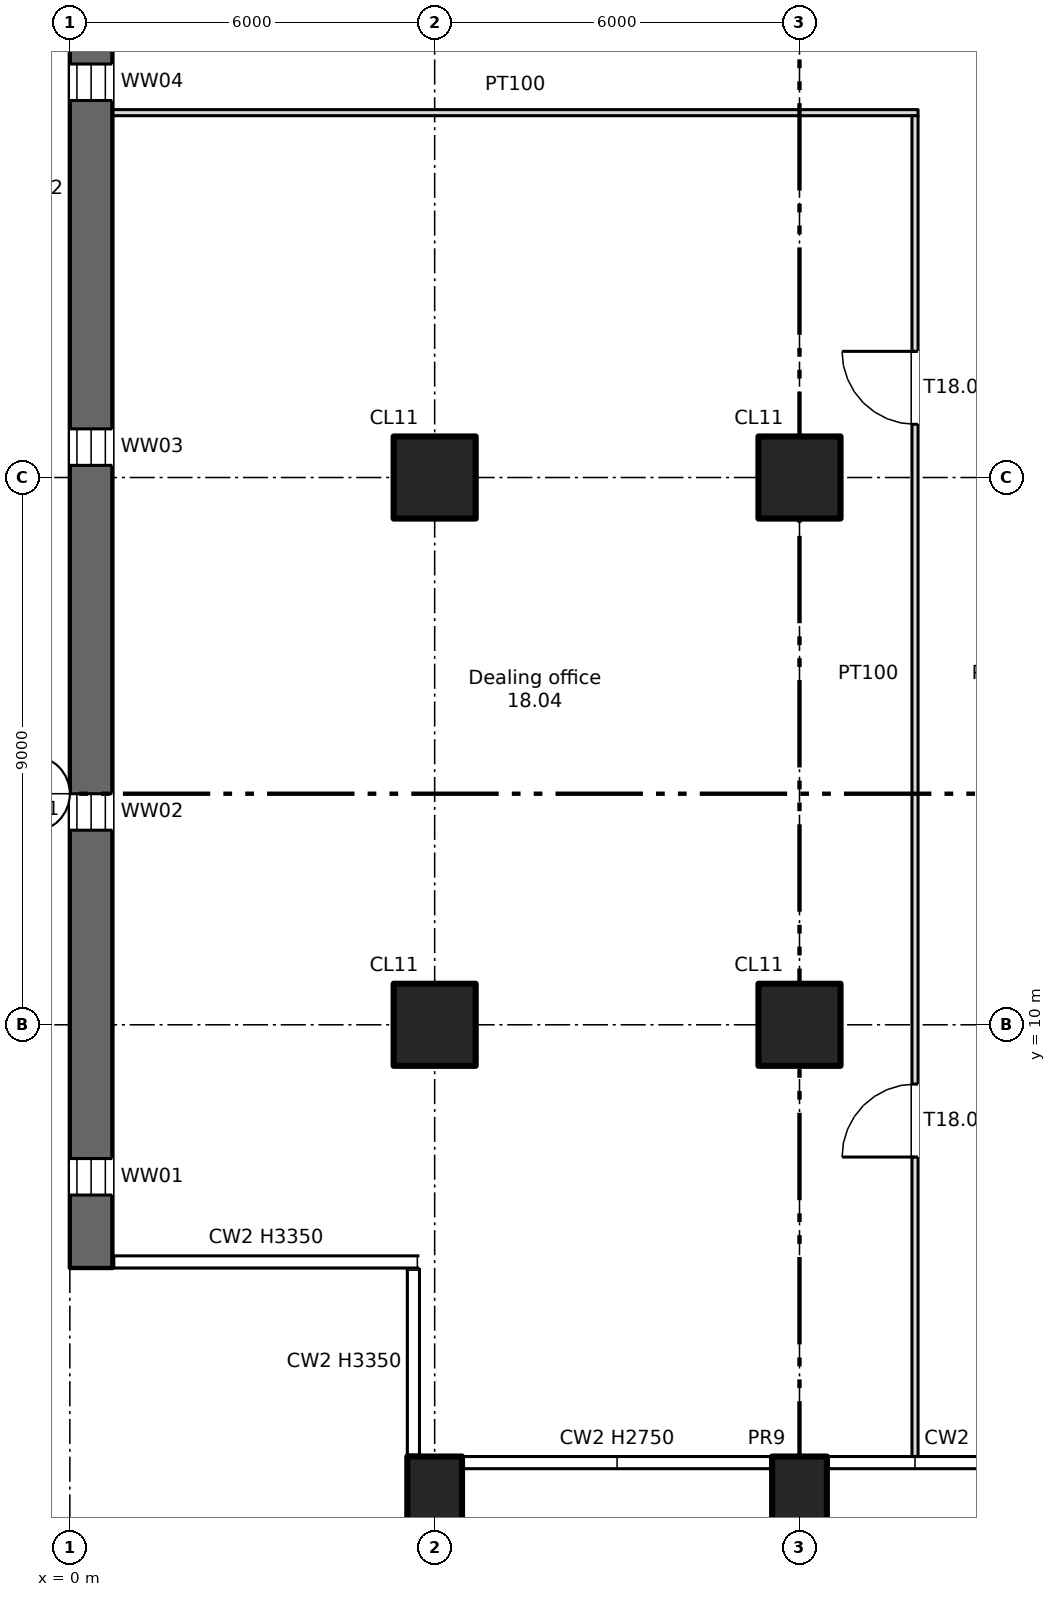
"""IFC4 building model, lengths in metres.
Left out: names, types, materials, properties, quantities, classifications, styles, units other than length and angle.
Written with IfcOpenShell. Run it as: python <this file> out.ifc"""

import sys

from ifc_helpers import new_model, si_unit, direction, frame, frame_2d, origin, origin_2d, place, context, subcontext, project, spatial, rectangle, extrude, element, fill, save


model = new_model("IFC4")
c1 = context("Model", 3, precision=1e-05, world=origin(), true_north=direction((0.0, 1.0)))
c2 = subcontext(c1, "Body", "Model", "MODEL_VIEW")
j1 = project(units=[si_unit("LENGTHUNIT", "METRE"), si_unit("PLANEANGLEUNIT", "RADIAN")], contexts=[c1])
p1 = place(None, origin())
s1 = spatial("IfcSite", under=j1, at=p1, CompositionType="ELEMENT")
p2 = place(p1, origin())
s2 = spatial("IfcBuilding", under=s1, at=p2, CompositionType="ELEMENT")
p3 = place(p2, frame((0.0, 0.0, 113.75)))
s3 = spatial("IfcBuildingStorey", under=s2, at=p3, CompositionType="ELEMENT", Elevation=113.75)
for number, where, z_axis, x_axis in (
    (1, (6.0, 2.2, -0.4), (0.0, 0.0, 1.0), (1.0, 0.0, 0.0)),
    (2, (12.0, 2.2, -0.4), (0.0, 0.0, 1.0), (1.0, 0.0, 0.0)),
):
    element("IfcColumn", number, at=place(p3, frame(where, z_axis=z_axis, x_axis=x_axis)), inside=s3, PredefinedType="COLUMN", context=c2, shape_type="SweptSolid", body=[
        extrude(rectangle(XDim=0.9, YDim=1.4, at=origin_2d()), origin(), (0.0, 0.0, 1.0), 3.75),
    ])
for number, where, z_axis, x_axis in (
    (3, (6.0, 10.0, 0.0), (0.0, 0.0, 1.0), (1.0, 0.0, 0.0)),
    (4, (6.0, 19.0, 0.0), (0.0, 0.0, 1.0), (1.0, 0.0, 0.0)),
    (5, (12.0, 10.0, 0.0), (0.0, 0.0, 1.0), (1.0, 0.0, 0.0)),
    (6, (12.0, 19.0, 0.0), (0.0, 0.0, 1.0), (1.0, 0.0, 0.0)),
):
    element("IfcColumn", number, at=place(p3, frame(where, z_axis=z_axis, x_axis=x_axis)), inside=s3, PredefinedType="COLUMN", context=c2, shape_type="SweptSolid", body=[
        extrude(rectangle(XDim=1.35, YDim=1.35, at=origin_2d()), origin(), (0.0, 0.0, 1.0), 3.35),
    ])
p4 = place(p3, frame((0.35, 6.0, 0.0), z_axis=(0.0, 0.0, 1.0), x_axis=(0.0, 1.0, 0.0)))
e7 = element("IfcWall", 7, at=p4, inside=s3, PredefinedType="SHEAR", context=c2, shape_type="SweptSolid", body=[
    extrude(rectangle(XDim=35.5, YDim=0.7, at=frame_2d((17.75, 0.0))), origin(), (0.0, 0.0, 1.0), 3.35),
])
p5 = place(p4, frame((1.2, 0.0, 0.6)))
e8 = element("IfcOpeningElement", 8, at=p5, cuts=e7, PredefinedType="OPENING", context=c2, shape_type="SweptSolid", body=[
    extrude(rectangle(XDim=0.6, YDim=2.4, at=frame_2d((0.3, 1.2))), frame((0.0, 0.36, 0.0), z_axis=(0.0, -1.0, 0.0), x_axis=(1.0, 0.0, 0.0)), (0.0, 0.0, 1.0), 0.72),
])
p6 = place(p4, frame((7.2, 0.0, 0.6)))
e9 = element("IfcOpeningElement", 9, at=p6, cuts=e7, PredefinedType="OPENING", context=c2, shape_type="SweptSolid", body=[
    extrude(rectangle(XDim=0.6, YDim=2.4, at=frame_2d((0.3, 1.2))), frame((0.0, 0.36, 0.0), z_axis=(0.0, -1.0, 0.0), x_axis=(1.0, 0.0, 0.0)), (0.0, 0.0, 1.0), 0.72),
])
p7 = place(p4, frame((13.2, 0.0, 0.6)))
e10 = element("IfcOpeningElement", 10, at=p7, cuts=e7, PredefinedType="OPENING", context=c2, shape_type="SweptSolid", body=[
    extrude(rectangle(XDim=0.6, YDim=2.4, at=frame_2d((0.3, 1.2))), frame((0.0, 0.36, 0.0), z_axis=(0.0, -1.0, 0.0), x_axis=(1.0, 0.0, 0.0)), (0.0, 0.0, 1.0), 0.72),
])
p8 = place(p4, frame((19.2, 0.0, 0.6)))
e11 = element("IfcOpeningElement", 11, at=p8, cuts=e7, PredefinedType="OPENING", context=c2, shape_type="SweptSolid", body=[
    extrude(rectangle(XDim=0.6, YDim=2.4, at=frame_2d((0.3, 1.2))), frame((0.0, 0.36, 0.0), z_axis=(0.0, -1.0, 0.0), x_axis=(1.0, 0.0, 0.0)), (0.0, 0.0, 1.0), 0.72),
])
p9 = place(p4, frame((25.2, 0.0, 0.6)))
e12 = element("IfcOpeningElement", 12, at=p9, cuts=e7, PredefinedType="OPENING", context=c2, shape_type="SweptSolid", body=[
    extrude(rectangle(XDim=0.6, YDim=2.4, at=frame_2d((0.3, 1.2))), frame((0.0, 0.36, 0.0), z_axis=(0.0, -1.0, 0.0), x_axis=(1.0, 0.0, 0.0)), (0.0, 0.0, 1.0), 0.72),
])
p10 = place(p4, frame((31.2, 0.0, 0.6)))
e13 = element("IfcOpeningElement", 13, at=p10, cuts=e7, PredefinedType="OPENING", context=c2, shape_type="SweptSolid", body=[
    extrude(rectangle(XDim=0.6, YDim=2.4, at=frame_2d((0.3, 1.2))), frame((0.0, 0.36, 0.0), z_axis=(0.0, -1.0, 0.0), x_axis=(1.0, 0.0, 0.0)), (0.0, 0.0, 1.0), 0.72),
])
p11 = place(p3, frame((0.7, 25.0, 0.0), z_axis=(0.0, 0.0, 1.0), x_axis=(1.0, 0.0, 0.0)))
e14 = element("IfcWall", 14, at=p11, inside=s3, PredefinedType="PARTITIONING", context=c2, shape_type="SweptSolid", body=[
    extrude(rectangle(XDim=13.25, YDim=0.1, at=frame_2d((6.625, 0.0))), origin(), (0.0, 0.0, 1.0), 3.35),
])
p12 = place(p3, frame((13.9, 2.9, 0.0), z_axis=(0.0, 0.0, 1.0), x_axis=(0.0, 1.0, 0.0)))
e15 = element("IfcWall", 15, at=p12, inside=s3, PredefinedType="PARTITIONING", context=c2, shape_type="SweptSolid", body=[
    extrude(rectangle(XDim=22.05, YDim=0.1, at=frame_2d((11.025, 0.0))), origin(), (0.0, 0.0, 1.0), 3.35),
])
p13 = place(p12, frame((4.925, 0.0, 0.0)))
e16 = element("IfcOpeningElement", 16, at=p13, cuts=e15, PredefinedType="OPENING", context=c2, shape_type="SweptSolid", body=[
    extrude(rectangle(XDim=1.2, YDim=2.1, at=frame_2d((0.6, 1.05))), frame((0.0, 0.06, 0.0), z_axis=(0.0, -1.0, 0.0), x_axis=(1.0, 0.0, 0.0)), (0.0, 0.0, 1.0), 0.12),
])
p14 = place(p12, frame((16.975, 0.0, 0.0)))
e17 = element("IfcOpeningElement", 17, at=p14, cuts=e15, PredefinedType="OPENING", context=c2, shape_type="SweptSolid", body=[
    extrude(rectangle(XDim=1.2, YDim=2.1, at=frame_2d((0.6, 1.05))), frame((0.0, 0.06, 0.0), z_axis=(0.0, -1.0, 0.0), x_axis=(1.0, 0.0, 0.0)), (0.0, 0.0, 1.0), 0.12),
])
p15 = place(p5, origin())
e18 = element("IfcWindow", 18, at=p15, inside=s3, PartitioningType="SINGLE_PANEL", PredefinedType="WINDOW", context=c2, shape_type="SweptSolid", body=[
    extrude(rectangle(XDim=0.6, YDim=2.4, at=frame_2d((0.3, 1.2))), frame((0.0, 0.03, 0.0), z_axis=(0.0, -1.0, 0.0), x_axis=(1.0, 0.0, 0.0)), (0.0, 0.0, 1.0), 0.06),
])
fill(e8, e18)
p16 = place(p6, origin())
e19 = element("IfcWindow", 19, at=p16, inside=s3, PartitioningType="SINGLE_PANEL", PredefinedType="WINDOW", context=c2, shape_type="SweptSolid", body=[
    extrude(rectangle(XDim=0.6, YDim=2.4, at=frame_2d((0.3, 1.2))), frame((0.0, 0.03, 0.0), z_axis=(0.0, -1.0, 0.0), x_axis=(1.0, 0.0, 0.0)), (0.0, 0.0, 1.0), 0.06),
])
fill(e9, e19)
p17 = place(p7, origin())
e20 = element("IfcWindow", 20, at=p17, inside=s3, PartitioningType="SINGLE_PANEL", PredefinedType="WINDOW", context=c2, shape_type="SweptSolid", body=[
    extrude(rectangle(XDim=0.6, YDim=2.4, at=frame_2d((0.3, 1.2))), frame((0.0, 0.03, 0.0), z_axis=(0.0, -1.0, 0.0), x_axis=(1.0, 0.0, 0.0)), (0.0, 0.0, 1.0), 0.06),
])
fill(e10, e20)
p18 = place(p8, origin())
e21 = element("IfcWindow", 21, at=p18, inside=s3, PartitioningType="SINGLE_PANEL", PredefinedType="WINDOW", context=c2, shape_type="SweptSolid", body=[
    extrude(rectangle(XDim=0.6, YDim=2.4, at=frame_2d((0.3, 1.2))), frame((0.0, 0.03, 0.0), z_axis=(0.0, -1.0, 0.0), x_axis=(1.0, 0.0, 0.0)), (0.0, 0.0, 1.0), 0.06),
])
fill(e11, e21)
p19 = place(p13, origin())
e22 = element("IfcDoor", 22, at=p19, inside=s3, OperationType="SINGLE_SWING_LEFT", PredefinedType="DOOR", context=c2, shape_type="SweptSolid", body=[
    extrude(rectangle(XDim=1.2, YDim=2.1, at=frame_2d((0.6, 1.05))), frame((0.0, 0.025, 0.0), z_axis=(0.0, -1.0, 0.0), x_axis=(1.0, 0.0, 0.0)), (0.0, 0.0, 1.0), 0.05),
])
fill(e16, e22)
p20 = place(p14, origin())
e23 = element("IfcDoor", 23, at=p20, inside=s3, OperationType="SINGLE_SWING_RIGHT", PredefinedType="DOOR", context=c2, shape_type="SweptSolid", body=[
    extrude(rectangle(XDim=1.2, YDim=2.1, at=frame_2d((0.6, 1.05))), frame((0.0, 0.025, 0.0), z_axis=(0.0, -1.0, 0.0), x_axis=(1.0, 0.0, 0.0)), (0.0, 0.0, 1.0), 0.05),
])
fill(e17, e23)
save(model, sys.argv[1])
